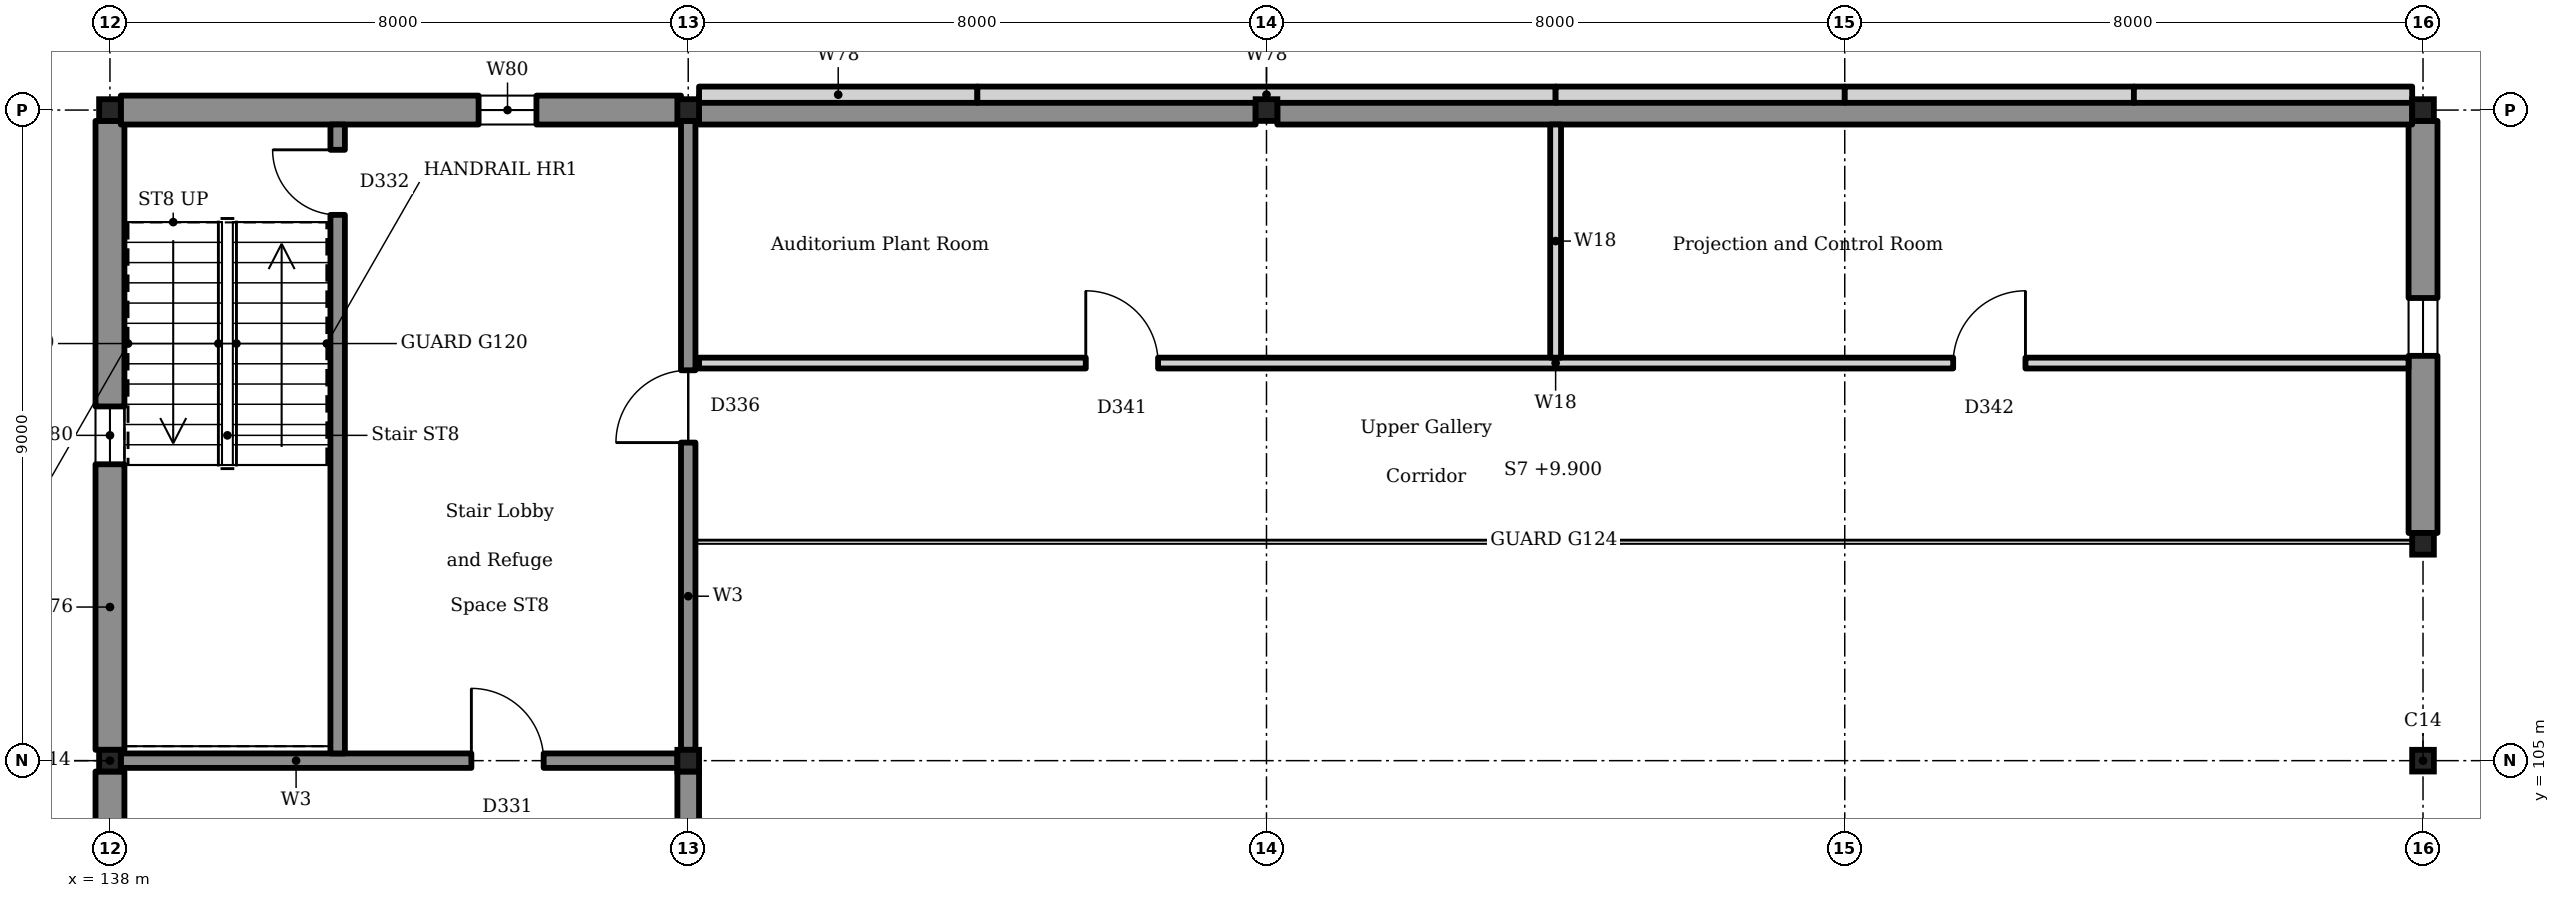
"""IFC4 building model, lengths in metres.
Left out: names, types, materials, properties, quantities, classifications, styles, units other than length and angle.
Written with IfcOpenShell. Run it as: python <this file> out.ifc"""

import sys

from ifc_helpers import new_model, si_unit, direction, frame, frame_2d, origin, origin_2d, place, context, subcontext, project, spatial, rectangle, i_section, extrude, element, fill, save


model = new_model("IFC4")
c1 = context("Model", 3, precision=1e-05, world=origin(), true_north=direction((0.0, 1.0)))
c2 = subcontext(c1, "Body", "Model", "MODEL_VIEW")
j1 = project(units=[si_unit("LENGTHUNIT", "METRE"), si_unit("PLANEANGLEUNIT", "RADIAN")], contexts=[c1])
p1 = place(None, origin())
s1 = spatial("IfcSite", under=j1, at=p1, CompositionType="ELEMENT")
p2 = place(p1, origin())
s2 = spatial("IfcBuilding", under=s1, at=p2, CompositionType="ELEMENT")
p3 = place(p2, frame((0.0, 0.0, 9.9)))
s3 = spatial("IfcBuildingStorey", under=s2, at=p3, CompositionType="ELEMENT", Elevation=9.9)
p4 = place(p3, frame((138.0, 105.0, 0.0), z_axis=(0.0, 0.0, 1.0), x_axis=(1.0, 0.0, 0.0)))
e1 = element("IfcColumn", 1, at=p4, inside=s3, PredefinedType="COLUMN", context=c2, shape_type="SweptSolid", body=[
    extrude(i_section(OverallWidth=0.3, OverallDepth=0.3, WebThickness=0.011, FlangeThickness=0.019, FilletRadius=0.027, at=origin_2d()), origin(), (0.0, 0.0, 1.0), 4.5),
])
p5 = place(p3, frame((170.0, 105.0, 0.0), z_axis=(0.0, 0.0, 1.0), x_axis=(1.0, 0.0, 0.0)))
e2 = element("IfcColumn", 2, at=p5, inside=s3, PredefinedType="COLUMN", context=c2, shape_type="SweptSolid", body=[
    extrude(i_section(OverallWidth=0.3, OverallDepth=0.3, WebThickness=0.011, FlangeThickness=0.019, FilletRadius=0.027, at=origin_2d()), origin(), (0.0, 0.0, 1.0), 4.05),
])
p6 = place(p3, frame((138.0, 114.0, 0.0), z_axis=(0.0, 0.0, 1.0), x_axis=(1.0, 0.0, 0.0)))
e3 = element("IfcColumn", 3, at=p6, inside=s3, PredefinedType="COLUMN", context=c2, shape_type="SweptSolid", body=[
    extrude(i_section(OverallWidth=0.3, OverallDepth=0.3, WebThickness=0.011, FlangeThickness=0.019, FilletRadius=0.027, at=origin_2d()), origin(), (0.0, 0.0, 1.0), 4.5),
])
p7 = place(p3, frame((170.0, 114.0, 0.0), z_axis=(0.0, 0.0, 1.0), x_axis=(1.0, 0.0, 0.0)))
e4 = element("IfcColumn", 4, at=p7, inside=s3, PredefinedType="COLUMN", context=c2, shape_type="SweptSolid", body=[
    extrude(i_section(OverallWidth=0.3, OverallDepth=0.3, WebThickness=0.011, FlangeThickness=0.019, FilletRadius=0.027, at=origin_2d()), origin(), (0.0, 0.0, 1.0), 4.05),
])
for number, where, z_axis, x_axis in (
    (5, (146.0, 105.0, 0.0), (0.0, 0.0, 1.0), (1.0, 0.0, 0.0)),
    (6, (146.0, 114.0, 0.0), (0.0, 0.0, 1.0), (1.0, 0.0, 0.0)),
):
    element("IfcColumn", number, at=place(p3, frame(where, z_axis=z_axis, x_axis=x_axis)), inside=s3, PredefinedType="COLUMN", context=c2, shape_type="SweptSolid", body=[
        extrude(i_section(OverallWidth=0.3, OverallDepth=0.3, WebThickness=0.011, FlangeThickness=0.019, FilletRadius=0.027, at=origin_2d()), origin(), (0.0, 0.0, 1.0), 4.5),
    ])
p8 = place(p3, frame((154.0, 114.0, 0.0), z_axis=(0.0, 0.0, 1.0), x_axis=(1.0, 0.0, 0.0)))
e7 = element("IfcColumn", 7, at=p8, inside=s3, PredefinedType="COLUMN", context=c2, shape_type="SweptSolid", body=[
    extrude(i_section(OverallWidth=0.3, OverallDepth=0.3, WebThickness=0.011, FlangeThickness=0.019, FilletRadius=0.027, at=origin_2d()), origin(), (0.0, 0.0, 1.0), 2.85),
])
p9 = place(p3, frame((170.0, 108.0, 0.0), z_axis=(0.0, 0.0, 1.0), x_axis=(1.0, 0.0, 0.0)))
e8 = element("IfcColumn", 8, at=p9, inside=s3, PredefinedType="COLUMN", context=c2, shape_type="SweptSolid", body=[
    extrude(i_section(OverallWidth=0.3, OverallDepth=0.3, WebThickness=0.011, FlangeThickness=0.019, FilletRadius=0.027, at=origin_2d()), origin(), (0.0, 0.0, 1.0), 4.05),
])
p10 = place(p2, origin())
s4 = spatial("IfcBuildingStorey", under=s2, at=p10, CompositionType="ELEMENT", Elevation=0.0)
p11 = place(p10, frame((170.0, 96.15, 0.0), z_axis=(0.0, 0.0, 1.0), x_axis=(0.0, 1.0, 0.0)))
e9 = element("IfcWall", 9, at=p11, inside=s4, PredefinedType="SOLIDWALL", context=c2, shape_type="SweptSolid", body=[
    extrude(rectangle(XDim=8.7, YDim=0.4, at=frame_2d((4.35, 0.0))), origin(), (0.0, 0.0, 1.0), 13.95),
])
p12 = place(p2, frame((0.0, 0.0, 5.4)))
s5 = spatial("IfcBuildingStorey", under=s2, at=p12, CompositionType="ELEMENT", Elevation=5.4)
p13 = place(p12, frame((170.0, 105.15, 0.0), z_axis=(0.0, 0.0, 1.0), x_axis=(0.0, 1.0, 0.0)))
e10 = element("IfcWall", 10, at=p13, inside=s5, PredefinedType="SOLIDWALL", context=c2, shape_type="SweptSolid", body=[
    extrude(rectangle(XDim=2.7, YDim=0.4, at=frame_2d((1.35, 0.0))), origin(), (0.0, 0.0, 1.0), 8.55),
])
p14 = place(p3, frame((138.0, 96.15, 0.0), z_axis=(0.0, 0.0, 1.0), x_axis=(0.0, 1.0, 0.0)))
e11 = element("IfcWall", 11, at=p14, inside=s3, PredefinedType="SOLIDWALL", context=c2, shape_type="SweptSolid", body=[
    extrude(rectangle(XDim=8.7, YDim=0.4, at=frame_2d((4.35, 0.0))), origin(), (0.0, 0.0, 1.0), 4.05),
])
p15 = place(p14, frame((3.45, 0.0, 0.0)))
e12 = element("IfcOpeningElement", 12, at=p15, cuts=e11, PredefinedType="OPENING", context=c2, shape_type="SweptSolid", body=[
    extrude(rectangle(XDim=1.8, YDim=2.4, at=frame_2d((0.9, 1.2))), frame((0.0, 0.21, 0.0), z_axis=(0.0, -1.0, 0.0), x_axis=(1.0, 0.0, 0.0)), (0.0, 0.0, 1.0), 0.42),
])
p16 = place(p3, frame((138.0, 105.15, 0.0), z_axis=(0.0, 0.0, 1.0), x_axis=(0.0, 1.0, 0.0)))
e13 = element("IfcWall", 13, at=p16, inside=s3, PredefinedType="SOLIDWALL", context=c2, shape_type="SweptSolid", body=[
    extrude(rectangle(XDim=8.7, YDim=0.4, at=frame_2d((4.35, 0.0))), origin(), (0.0, 0.0, 1.0), 4.25),
])
p17 = place(p16, frame((3.95, 0.0, 0.9)))
e14 = element("IfcOpeningElement", 14, at=p17, cuts=e13, PredefinedType="OPENING", context=c2, shape_type="SweptSolid", body=[
    extrude(rectangle(XDim=0.8, YDim=1.8, at=frame_2d((0.4, 0.9))), frame((0.0, 0.21, 0.0), z_axis=(0.0, -1.0, 0.0), x_axis=(1.0, 0.0, 0.0)), (0.0, 0.0, 1.0), 0.42),
])
p18 = place(p3, frame((170.0, 108.15, 0.0), z_axis=(0.0, 0.0, 1.0), x_axis=(0.0, 1.0, 0.0)))
e15 = element("IfcWall", 15, at=p18, inside=s3, PredefinedType="SOLIDWALL", context=c2, shape_type="SweptSolid", body=[
    extrude(rectangle(XDim=5.7, YDim=0.4, at=frame_2d((2.85, 0.0))), origin(), (0.0, 0.0, 1.0), 4.05),
])
p19 = place(p18, frame((2.45, 0.0, 0.9)))
e16 = element("IfcOpeningElement", 16, at=p19, cuts=e15, PredefinedType="OPENING", context=c2, shape_type="SweptSolid", body=[
    extrude(rectangle(XDim=0.8, YDim=1.8, at=frame_2d((0.4, 0.9))), frame((0.0, 0.21, 0.0), z_axis=(0.0, -1.0, 0.0), x_axis=(1.0, 0.0, 0.0)), (0.0, 0.0, 1.0), 0.42),
])
p20 = place(p3, frame((138.15, 114.0, 0.0), z_axis=(0.0, 0.0, 1.0), x_axis=(1.0, 0.0, 0.0)))
e17 = element("IfcWall", 17, at=p20, inside=s3, PredefinedType="SOLIDWALL", context=c2, shape_type="SweptSolid", body=[
    extrude(rectangle(XDim=7.75, YDim=0.4, at=frame_2d((3.875, 0.0))), origin(), (0.0, 0.0, 1.0), 4.25),
])
p21 = place(p20, frame((4.95, 0.0, 0.9)))
e18 = element("IfcOpeningElement", 18, at=p21, cuts=e17, PredefinedType="OPENING", context=c2, shape_type="SweptSolid", body=[
    extrude(rectangle(XDim=0.8, YDim=1.8, at=frame_2d((0.4, 0.9))), frame((0.0, 0.21, 0.0), z_axis=(0.0, -1.0, 0.0), x_axis=(1.0, 0.0, 0.0)), (0.0, 0.0, 1.0), 0.42),
])
p22 = place(p3, frame((146.15, 114.0, 0.0), z_axis=(0.0, 0.0, 1.0), x_axis=(1.0, 0.0, 0.0)))
e19 = element("IfcWall", 19, at=p22, inside=s3, PredefinedType="SOLIDWALL", context=c2, shape_type="SweptSolid", body=[
    extrude(rectangle(XDim=7.7, YDim=0.4, at=frame_2d((3.85, 0.0))), origin(), (0.0, 0.0, 1.0), 2.85),
])
p23 = place(p3, frame((154.15, 114.0, 0.0), z_axis=(0.0, 0.0, 1.0), x_axis=(1.0, 0.0, 0.0)))
e20 = element("IfcWall", 20, at=p23, inside=s3, PredefinedType="SOLIDWALL", context=c2, shape_type="SweptSolid", body=[
    extrude(rectangle(XDim=15.7, YDim=0.4, at=frame_2d((7.85, 0.0))), origin(), (0.0, 0.0, 1.0), 2.85),
])
p24 = place(p3, frame((146.15, 114.212, 2.85), z_axis=(0.0, 0.0, 1.0), x_axis=(1.0, 0.0, 0.0)))
e21 = element("IfcWall", 21, at=p24, inside=s3, PredefinedType="SOLIDWALL", context=c2, shape_type="SweptSolid", body=[
    extrude(rectangle(XDim=3.85, YDim=0.225, at=frame_2d((1.925, 0.0))), origin(), (0.0, 0.0, 1.0), 4.65),
])
p25 = place(p3, frame((150.0, 114.212, 2.85), z_axis=(0.0, 0.0, 1.0), x_axis=(1.0, 0.0, 0.0)))
e22 = element("IfcWall", 22, at=p25, inside=s3, PredefinedType="SOLIDWALL", context=c2, shape_type="SweptSolid", body=[
    extrude(rectangle(XDim=8.0, YDim=0.225, at=frame_2d((4.0, 0.0))), origin(), (0.0, 0.0, 1.0), 5.65),
])
p26 = place(p3, frame((158.0, 114.212, 2.85), z_axis=(0.0, 0.0, 1.0), x_axis=(1.0, 0.0, 0.0)))
e23 = element("IfcWall", 23, at=p26, inside=s3, PredefinedType="SOLIDWALL", context=c2, shape_type="SweptSolid", body=[
    extrude(rectangle(XDim=4.0, YDim=0.225, at=frame_2d((2.0, 0.0))), origin(), (0.0, 0.0, 1.0), 4.65),
])
p27 = place(p3, frame((162.0, 114.212, 2.85), z_axis=(0.0, 0.0, 1.0), x_axis=(1.0, 0.0, 0.0)))
e24 = element("IfcWall", 24, at=p27, inside=s3, PredefinedType="SOLIDWALL", context=c2, shape_type="SweptSolid", body=[
    extrude(rectangle(XDim=4.0, YDim=0.225, at=frame_2d((2.0, 0.0))), origin(), (0.0, 0.0, 1.0), 3.65),
])
p28 = place(p3, frame((166.0, 114.212, 2.85), z_axis=(0.0, 0.0, 1.0), x_axis=(1.0, 0.0, 0.0)))
e25 = element("IfcWall", 25, at=p28, inside=s3, PredefinedType="SOLIDWALL", context=c2, shape_type="SweptSolid", body=[
    extrude(rectangle(XDim=3.85, YDim=0.225, at=frame_2d((1.925, 0.0))), origin(), (0.0, 0.0, 1.0), 2.65),
])
p29 = place(p3, frame((146.0, 95.9, 0.0), z_axis=(0.0, 0.0, 1.0), x_axis=(0.0, 1.0, 0.0)))
e26 = element("IfcWall", 26, at=p29, inside=s3, PredefinedType="SOLIDWALL", context=c2, shape_type="SweptSolid", body=[
    extrude(rectangle(XDim=8.95, YDim=0.3, at=frame_2d((4.475, 0.0))), origin(), (0.0, 0.0, 1.0), 6.05),
])
p30 = place(p3, frame((146.0, 105.15, 0.0), z_axis=(0.0, 0.0, 1.0), x_axis=(0.0, 1.0, 0.0)))
e27 = element("IfcWall", 27, at=p30, inside=s3, PredefinedType="SOLIDWALL", context=c2, shape_type="SweptSolid", body=[
    extrude(rectangle(XDim=8.7, YDim=0.2, at=frame_2d((4.35, 0.0))), origin(), (0.0, 0.0, 1.0), 4.25),
])
p31 = place(p30, frame((4.25, 0.0, 0.0)))
e28 = element("IfcOpeningElement", 28, at=p31, cuts=e27, PredefinedType="OPENING", context=c2, shape_type="SweptSolid", body=[
    extrude(rectangle(XDim=1.0, YDim=2.1, at=frame_2d((0.5, 1.05))), frame((0.0, 0.11, 0.0), z_axis=(0.0, -1.0, 0.0), x_axis=(1.0, 0.0, 0.0)), (0.0, 0.0, 1.0), 0.22),
])
p32 = place(p3, frame((138.15, 105.0, 0.0), z_axis=(0.0, 0.0, 1.0), x_axis=(1.0, 0.0, 0.0)))
e29 = element("IfcWall", 29, at=p32, inside=s3, PredefinedType="SOLIDWALL", context=c2, shape_type="SweptSolid", body=[
    extrude(rectangle(XDim=7.7, YDim=0.2, at=frame_2d((3.85, 0.0))), origin(), (0.0, 0.0, 1.0), 4.25),
])
p33 = place(p32, frame((4.85, 0.0, 0.0)))
e30 = element("IfcOpeningElement", 30, at=p33, cuts=e29, PredefinedType="OPENING", context=c2, shape_type="SweptSolid", body=[
    extrude(rectangle(XDim=1.0, YDim=2.1, at=frame_2d((0.5, 1.05))), frame((0.0, 0.11, 0.0), z_axis=(0.0, -1.0, 0.0), x_axis=(1.0, 0.0, 0.0)), (0.0, 0.0, 1.0), 0.22),
])
p34 = place(p3, frame((141.15, 105.1, 0.0), z_axis=(0.0, 0.0, 1.0), x_axis=(0.0, 1.0, 0.0)))
e31 = element("IfcWall", 31, at=p34, inside=s3, PredefinedType="SOLIDWALL", context=c2, shape_type="SweptSolid", body=[
    extrude(rectangle(XDim=8.7, YDim=0.2, at=frame_2d((4.35, 0.0))), origin(), (0.0, 0.0, 1.0), 4.25),
])
p35 = place(p34, frame((7.45, 0.0, 0.0)))
e32 = element("IfcOpeningElement", 32, at=p35, cuts=e31, PredefinedType="OPENING", context=c2, shape_type="SweptSolid", body=[
    extrude(rectangle(XDim=0.9, YDim=2.1, at=frame_2d((0.45, 1.05))), frame((0.0, 0.11, 0.0), z_axis=(0.0, -1.0, 0.0), x_axis=(1.0, 0.0, 0.0)), (0.0, 0.0, 1.0), 0.22),
])
p36 = place(p3, frame((146.15, 110.5, 0.0), z_axis=(0.0, 0.0, 1.0), x_axis=(1.0, 0.0, 0.0)))
e33 = element("IfcWall", 33, at=p36, inside=s3, PredefinedType="PARTITIONING", context=c2, shape_type="SweptSolid", body=[
    extrude(rectangle(XDim=23.65, YDim=0.15, at=frame_2d((11.825, 0.0))), origin(), (0.0, 0.0, 1.0), 2.5),
])
p37 = place(p36, frame((5.35, 0.0, 0.0)))
e34 = element("IfcOpeningElement", 34, at=p37, cuts=e33, PredefinedType="OPENING", context=c2, shape_type="SweptSolid", body=[
    extrude(rectangle(XDim=1.0, YDim=2.1, at=frame_2d((0.5, 1.05))), frame((0.0, 0.085, 0.0), z_axis=(0.0, -1.0, 0.0), x_axis=(1.0, 0.0, 0.0)), (0.0, 0.0, 1.0), 0.17),
])
p38 = place(p36, frame((17.35, 0.0, 0.0)))
e35 = element("IfcOpeningElement", 35, at=p38, cuts=e33, PredefinedType="OPENING", context=c2, shape_type="SweptSolid", body=[
    extrude(rectangle(XDim=1.0, YDim=2.1, at=frame_2d((0.5, 1.05))), frame((0.0, 0.085, 0.0), z_axis=(0.0, -1.0, 0.0), x_axis=(1.0, 0.0, 0.0)), (0.0, 0.0, 1.0), 0.17),
])
p39 = place(p3, frame((158.0, 110.575, 0.0), z_axis=(0.0, 0.0, 1.0), x_axis=(0.0, 1.0, 0.0)))
e36 = element("IfcWall", 36, at=p39, inside=s3, PredefinedType="PARTITIONING", context=c2, shape_type="SweptSolid", body=[
    extrude(rectangle(XDim=3.225, YDim=0.15, at=frame_2d((1.613, 0.0))), origin(), (0.0, 0.0, 1.0), 2.5),
])
p40 = place(p17, origin())
e37 = element("IfcWindow", 37, at=p40, inside=s3, PartitioningType="SINGLE_PANEL", PredefinedType="WINDOW", context=c2, shape_type="SweptSolid", body=[
    extrude(rectangle(XDim=0.8, YDim=1.8, at=frame_2d((0.4, 0.9))), frame((0.0, 0.03, 0.0), z_axis=(0.0, -1.0, 0.0), x_axis=(1.0, 0.0, 0.0)), (0.0, 0.0, 1.0), 0.06),
])
fill(e14, e37)
p41 = place(p21, origin())
e38 = element("IfcWindow", 38, at=p41, inside=s3, PartitioningType="SINGLE_PANEL", PredefinedType="WINDOW", context=c2, shape_type="SweptSolid", body=[
    extrude(rectangle(XDim=0.8, YDim=1.8, at=frame_2d((0.4, 0.9))), frame((0.0, 0.03, 0.0), z_axis=(0.0, -1.0, 0.0), x_axis=(1.0, 0.0, 0.0)), (0.0, 0.0, 1.0), 0.06),
])
fill(e18, e38)
p42 = place(p19, origin())
e39 = element("IfcWindow", 39, at=p42, inside=s3, PartitioningType="SINGLE_PANEL", PredefinedType="WINDOW", context=c2, shape_type="SweptSolid", body=[
    extrude(rectangle(XDim=0.8, YDim=1.8, at=frame_2d((0.4, 0.9))), frame((0.0, 0.03, 0.0), z_axis=(0.0, -1.0, 0.0), x_axis=(1.0, 0.0, 0.0)), (0.0, 0.0, 1.0), 0.06),
])
fill(e16, e39)
p43 = place(p33, origin())
e40 = element("IfcDoor", 40, at=p43, inside=s3, OperationType="SINGLE_SWING_RIGHT", PredefinedType="DOOR", context=c2, shape_type="SweptSolid", body=[
    extrude(rectangle(XDim=1.0, YDim=2.1, at=frame_2d((0.5, 1.05))), frame((0.0, 0.025, 0.0), z_axis=(0.0, -1.0, 0.0), x_axis=(1.0, 0.0, 0.0)), (0.0, 0.0, 1.0), 0.05),
])
fill(e30, e40)
p44 = place(p35, origin())
e41 = element("IfcDoor", 41, at=p44, inside=s3, OperationType="SINGLE_SWING_LEFT", PredefinedType="DOOR", context=c2, shape_type="SweptSolid", body=[
    extrude(rectangle(XDim=0.9, YDim=2.1, at=frame_2d((0.45, 1.05))), frame((0.0, 0.025, 0.0), z_axis=(0.0, -1.0, 0.0), x_axis=(1.0, 0.0, 0.0)), (0.0, 0.0, 1.0), 0.05),
])
fill(e32, e41)
p45 = place(p31, origin())
e42 = element("IfcDoor", 42, at=p45, inside=s3, OperationType="SINGLE_SWING_RIGHT", PredefinedType="DOOR", context=c2, shape_type="SweptSolid", body=[
    extrude(rectangle(XDim=1.0, YDim=2.1, at=frame_2d((0.5, 1.05))), frame((0.0, 0.025, 0.0), z_axis=(0.0, -1.0, 0.0), x_axis=(1.0, 0.0, 0.0)), (0.0, 0.0, 1.0), 0.05),
])
fill(e28, e42)
p46 = place(p37, origin())
e43 = element("IfcDoor", 43, at=p46, inside=s3, OperationType="SINGLE_SWING_RIGHT", PredefinedType="DOOR", context=c2, shape_type="SweptSolid", body=[
    extrude(rectangle(XDim=1.0, YDim=2.1, at=frame_2d((0.5, 1.05))), frame((0.0, 0.025, 0.0), z_axis=(0.0, -1.0, 0.0), x_axis=(1.0, 0.0, 0.0)), (0.0, 0.0, 1.0), 0.05),
])
fill(e34, e43)
p47 = place(p38, origin())
e44 = element("IfcDoor", 44, at=p47, inside=s3, OperationType="SINGLE_SWING_LEFT", PredefinedType="DOOR", context=c2, shape_type="SweptSolid", body=[
    extrude(rectangle(XDim=1.0, YDim=2.1, at=frame_2d((0.5, 1.05))), frame((0.0, 0.025, 0.0), z_axis=(0.0, -1.0, 0.0), x_axis=(1.0, 0.0, 0.0)), (0.0, 0.0, 1.0), 0.05),
])
fill(e35, e44)
save(model, sys.argv[1])
